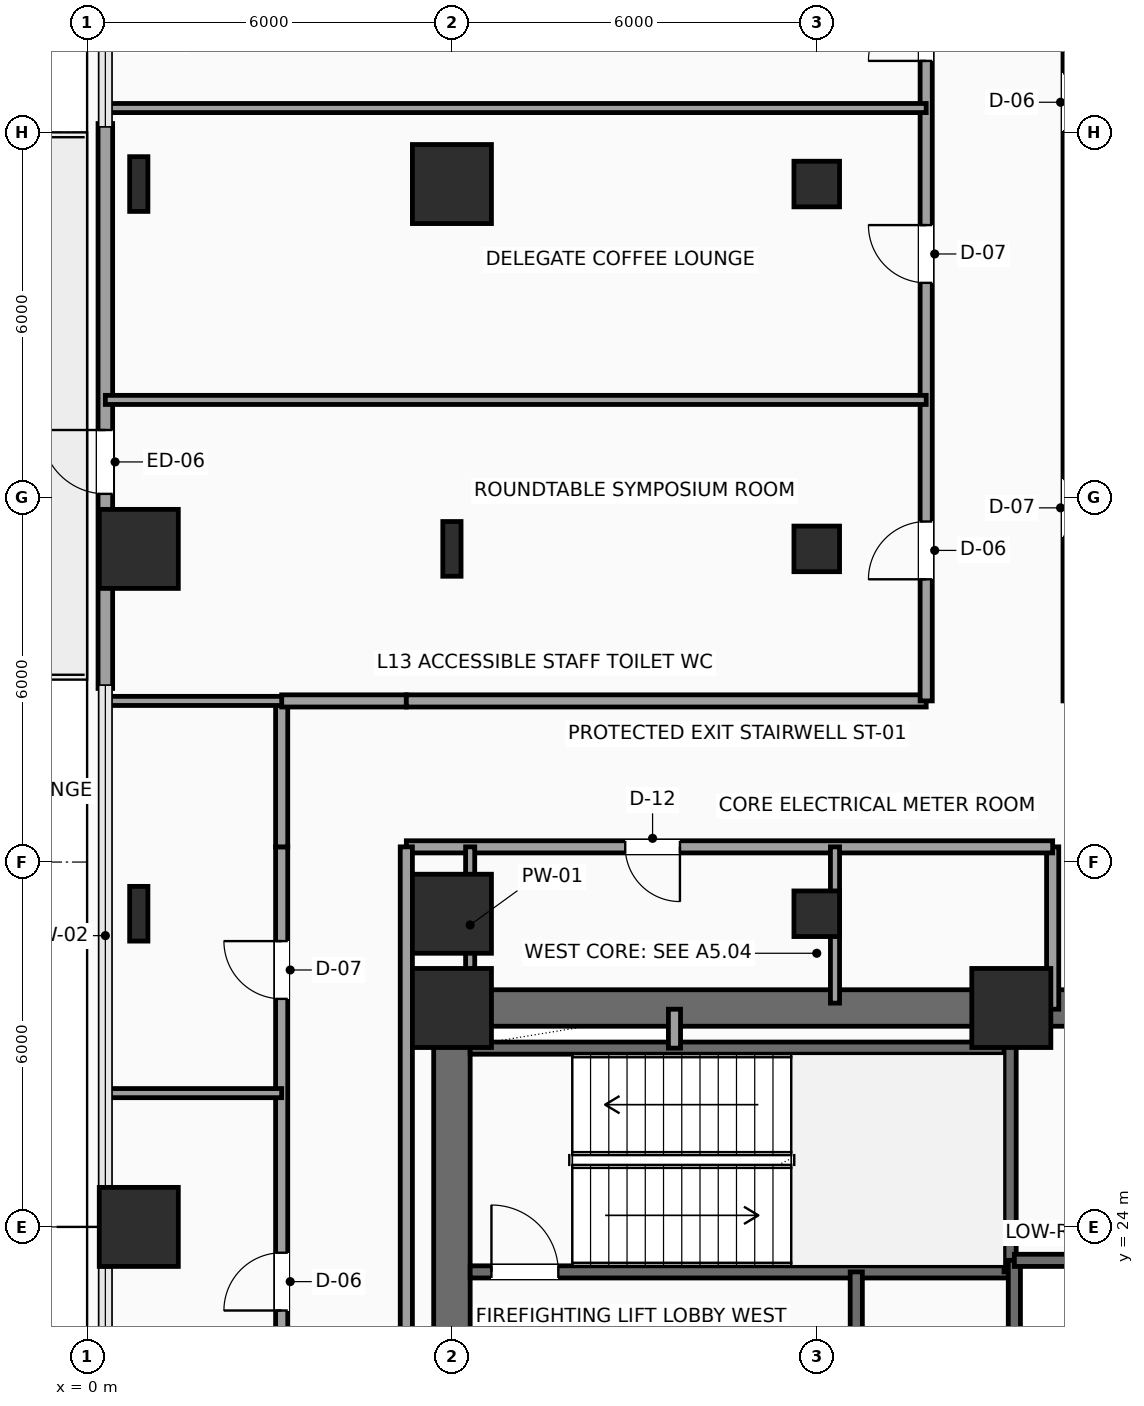
"""IFC4 building model, lengths in metres.
Left out: names, types, materials, properties, quantities, classifications, styles, units other than length and angle.
Written with IfcOpenShell. Run it as: python <this file> out.ifc"""

import sys

from ifc_helpers import new_model, si_unit, direction, frame, frame_2d, origin, origin_2d, place, context, subcontext, project, spatial, rectangle, hollow_rectangle, i_section, extrude, element, fill, save


model = new_model("IFC4")
c1 = context("Model", 3, precision=1e-05, world=origin(), true_north=direction((0.0, 1.0)))
c2 = subcontext(c1, "Body", "Model", "MODEL_VIEW")
j1 = project(units=[si_unit("LENGTHUNIT", "METRE"), si_unit("PLANEANGLEUNIT", "RADIAN")], contexts=[c1])
p1 = place(None, origin())
s1 = spatial("IfcSite", under=j1, at=p1, CompositionType="ELEMENT")
p2 = place(p1, origin())
s2 = spatial("IfcBuilding", under=s1, at=p2, CompositionType="ELEMENT")
p3 = place(p2, frame((0.0, 0.0, 59.7)))
s3 = spatial("IfcBuildingStorey", under=s2, at=p3, CompositionType="ELEMENT", Elevation=59.7)
for number, where, z_axis, x_axis in (
    (1, (6.0, 27.6, 0.0), (0.0, 0.0, 1.0), (1.0, 0.0, 0.0)),
    (2, (15.2, 27.6, 0.0), (0.0, 0.0, 1.0), (1.0, 0.0, 0.0)),
    (3, (0.85, 24.0, 0.0), (0.0, 0.0, 1.0), (1.0, 0.0, 0.0)),
):
    element("IfcColumn", number, at=place(p3, frame(where, z_axis=z_axis, x_axis=x_axis)), inside=s3, PredefinedType="COLUMN", context=c2, shape_type="SweptSolid", body=[
        extrude(rectangle(XDim=1.3, YDim=1.3, at=origin_2d()), origin(), (0.0, 0.0, 1.0), 3.9),
    ])
p4 = place(p3, frame((0.85, 29.15, 0.0), z_axis=(0.0, 0.0, 1.0), x_axis=(1.0, 0.0, 0.0)))
e4 = element("IfcColumn", 4, at=p4, inside=s3, PredefinedType="COLUMN", context=c2, shape_type="SweptSolid", body=[
    extrude(i_section(OverallWidth=0.3, OverallDepth=0.9, WebThickness=0.019, FlangeThickness=0.035, FilletRadius=0.03, at=origin_2d()), origin(), (0.0, 0.0, 1.0), 3.9),
])
p5 = place(p3, frame((0.85, 35.15, 0.0), z_axis=(0.0, 0.0, 1.0), x_axis=(1.0, 0.0, 0.0)))
e5 = element("IfcColumn", 5, at=p5, inside=s3, PredefinedType="COLUMN", context=c2, shape_type="SweptSolid", body=[
    extrude(rectangle(XDim=1.3, YDim=1.3, at=origin_2d()), origin(), (0.0, 0.0, 1.0), 3.9),
])
p6 = place(p3, frame((0.85, 41.15, 0.0), z_axis=(0.0, 0.0, 1.0), x_axis=(1.0, 0.0, 0.0)))
e6 = element("IfcColumn", 6, at=p6, inside=s3, PredefinedType="COLUMN", context=c2, shape_type="SweptSolid", body=[
    extrude(i_section(OverallWidth=0.3, OverallDepth=0.9, WebThickness=0.019, FlangeThickness=0.035, FilletRadius=0.03, at=origin_2d()), origin(), (0.0, 0.0, 1.0), 3.9),
])
p7 = place(p3, frame((6.0, 29.15, 0.0), z_axis=(0.0, 0.0, 1.0), x_axis=(1.0, 0.0, 0.0)))
e7 = element("IfcColumn", 7, at=p7, inside=s3, PredefinedType="COLUMN", context=c2, shape_type="SweptSolid", body=[
    extrude(rectangle(XDim=1.3, YDim=1.3, at=origin_2d()), origin(), (0.0, 0.0, 1.0), 3.9),
])
p8 = place(p3, frame((6.0, 35.15, 0.0), z_axis=(0.0, 0.0, 1.0), x_axis=(1.0, 0.0, 0.0)))
e8 = element("IfcColumn", 8, at=p8, inside=s3, PredefinedType="COLUMN", context=c2, shape_type="SweptSolid", body=[
    extrude(i_section(OverallWidth=0.3, OverallDepth=0.9, WebThickness=0.019, FlangeThickness=0.035, FilletRadius=0.03, at=origin_2d()), origin(), (0.0, 0.0, 1.0), 3.9),
])
p9 = place(p3, frame((6.0, 41.15, 0.0), z_axis=(0.0, 0.0, 1.0), x_axis=(1.0, 0.0, 0.0)))
e9 = element("IfcColumn", 9, at=p9, inside=s3, PredefinedType="COLUMN", context=c2, shape_type="SweptSolid", body=[
    extrude(rectangle(XDim=1.3, YDim=1.3, at=origin_2d()), origin(), (0.0, 0.0, 1.0), 3.9),
])
for number, where, z_axis, x_axis in (
    (10, (12.0, 29.15, 0.0), (0.0, 0.0, 1.0), (1.0, 0.0, 0.0)),
    (11, (12.0, 35.15, 0.0), (0.0, 0.0, 1.0), (1.0, 0.0, 0.0)),
    (12, (12.0, 41.15, 0.0), (0.0, 0.0, 1.0), (1.0, 0.0, 0.0)),
):
    element("IfcColumn", number, at=place(p3, frame(where, z_axis=z_axis, x_axis=x_axis)), inside=s3, PredefinedType="COLUMN", context=c2, shape_type="SweptSolid", body=[
        extrude(hollow_rectangle(XDim=0.75, YDim=0.75, WallThickness=0.035, InnerFilletRadius=0.035, OuterFilletRadius=0.05, at=origin_2d()), origin(), (0.0, 0.0, 1.0), 3.9),
    ])
p10 = place(p3, frame((0.3, 32.855, 0.0), z_axis=(0.0, 0.0, 1.0), x_axis=(0.0, 1.0, 0.0)))
e13 = element("IfcWall", 13, at=p10, inside=s3, PredefinedType="SOLIDWALL", context=c2, shape_type="SweptSolid", body=[
    extrude(rectangle(XDim=9.29, YDim=0.24, at=frame_2d((4.645, 0.0))), origin(), (0.0, 0.0, 1.0), 3.65),
])
p11 = place(p10, frame((3.2, 0.0, 0.0)))
e14 = element("IfcOpeningElement", 14, at=p11, cuts=e13, PredefinedType="OPENING", context=c2, shape_type="SweptSolid", body=[
    extrude(rectangle(XDim=1.05, YDim=2.2, at=frame_2d((0.525, 1.1))), frame((0.0, 0.13, 0.0), z_axis=(0.0, -1.0, 0.0), x_axis=(1.0, 0.0, 0.0)), (0.0, 0.0, 1.0), 0.26),
])
p12 = place(p3, frame((6.0, 27.6, 0.0), z_axis=(0.0, 0.0, 1.0), x_axis=(1.0, 0.0, 0.0)))
e15 = element("IfcWall", 15, at=p12, inside=s3, PredefinedType="SHEAR", context=c2, shape_type="SweptSolid", body=[
    extrude(rectangle(XDim=12.0, YDim=0.6, at=frame_2d((6.0, 0.0))), origin(), (0.0, 0.0, 1.0), 3.65),
])
p13 = place(p12, frame((10.2, 0.0, 0.0)))
e16 = element("IfcOpeningElement", 16, at=p13, cuts=e15, PredefinedType="OPENING", context=c2, shape_type="SweptSolid", body=[
    extrude(rectangle(XDim=0.9, YDim=2.15, at=frame_2d((0.45, 1.075))), frame((0.0, 0.31, 0.0), z_axis=(0.0, -1.0, 0.0), x_axis=(1.0, 0.0, 0.0)), (0.0, 0.0, 1.0), 0.62),
])
p14 = place(p3, frame((6.0, 18.0, 0.0), z_axis=(0.0, 0.0, 1.0), x_axis=(0.0, 1.0, 0.0)))
e17 = element("IfcWall", 17, at=p14, inside=s3, PredefinedType="SHEAR", context=c2, shape_type="SweptSolid", body=[
    extrude(rectangle(XDim=9.6, YDim=0.6, at=frame_2d((4.8, 0.0))), origin(), (0.0, 0.0, 1.0), 3.65),
])
p15 = place(p3, frame((6.3, 23.26, 0.0), z_axis=(0.0, 0.0, 1.0), x_axis=(1.0, 0.0, 0.0)))
e18 = element("IfcWall", 18, at=p15, inside=s3, PredefinedType="SHEAR", context=c2, shape_type="SweptSolid", body=[
    extrude(rectangle(XDim=8.88, YDim=0.2, at=frame_2d((4.44, 0.0))), origin(), (0.0, 0.0, 1.0), 3.65),
])
p16 = place(p15, frame((0.35, 0.0, 0.0)))
e19 = element("IfcOpeningElement", 19, at=p16, cuts=e18, PredefinedType="OPENING", context=c2, shape_type="SweptSolid", body=[
    extrude(rectangle(XDim=1.1, YDim=2.2, at=frame_2d((0.55, 1.1))), frame((0.0, 0.11, 0.0), z_axis=(0.0, -1.0, 0.0), x_axis=(1.0, 0.0, 0.0)), (0.0, 0.0, 1.0), 0.22),
])
p17 = place(p3, frame((6.3, 26.94, 0.0), z_axis=(0.0, 0.0, 1.0), x_axis=(1.0, 0.0, 0.0)))
e20 = element("IfcWall", 20, at=p17, inside=s3, PredefinedType="SHEAR", context=c2, shape_type="SweptSolid", body=[
    extrude(rectangle(XDim=8.88, YDim=0.2, at=frame_2d((4.44, 0.0))), origin(), (0.0, 0.0, 1.0), 3.65),
])
p18 = place(p3, frame((15.18, 23.26, 0.0), z_axis=(0.0, 0.0, 1.0), x_axis=(0.0, 1.0, 0.0)))
e21 = element("IfcWall", 21, at=p18, inside=s3, PredefinedType="SHEAR", context=c2, shape_type="SweptSolid", body=[
    extrude(rectangle(XDim=4.04, YDim=0.2, at=frame_2d((2.02, 0.0))), origin(), (0.0, 0.0, 1.0), 3.65),
])
p19 = place(p3, frame((12.65, 20.42, 0.0), z_axis=(0.0, 0.0, 1.0), x_axis=(0.0, 1.0, 0.0)))
e22 = element("IfcWall", 22, at=p19, inside=s3, PredefinedType="SHEAR", context=c2, shape_type="SweptSolid", body=[
    extrude(rectangle(XDim=2.84, YDim=0.2, at=frame_2d((1.42, 0.0))), origin(), (0.0, 0.0, 1.0), 3.65),
])
p20 = place(p19, frame((0.9, 0.0, 0.0)))
e23 = element("IfcOpeningElement", 23, at=p20, cuts=e22, PredefinedType="OPENING", context=c2, shape_type="SweptSolid", body=[
    extrude(rectangle(XDim=0.9, YDim=2.15, at=frame_2d((0.45, 1.075))), frame((0.0, 0.11, 0.0), z_axis=(0.0, -1.0, 0.0), x_axis=(1.0, 0.0, 0.0)), (0.0, 0.0, 1.0), 0.22),
])
p21 = place(p3, frame((9.66, 26.94, 0.0), z_axis=(0.0, 0.0, 1.0), x_axis=(0.0, 1.0, 0.0)))
e24 = element("IfcWall", 24, at=p21, inside=s3, PredefinedType="SOLIDWALL", context=c2, shape_type="SweptSolid", body=[
    extrude(rectangle(XDim=0.64, YDim=0.2, at=frame_2d((0.32, 0.0))), origin(), (0.0, 0.0, 1.0), 3.65),
])
p22 = place(p3, frame((15.25, 18.25, 0.0), z_axis=(0.0, 0.0, 1.0), x_axis=(0.0, 1.0, 0.0)))
e25 = element("IfcWall", 25, at=p22, inside=s3, PredefinedType="SHEAR", context=c2, shape_type="SweptSolid", body=[
    extrude(rectangle(XDim=5.2, YDim=0.2, at=frame_2d((2.6, 0.0))), origin(), (0.0, 0.0, 1.0), 3.65),
])
p23 = place(p3, frame((15.25, 23.45, 0.0), z_axis=(0.0, 0.0, 1.0), x_axis=(1.0, 0.0, 0.0)))
e26 = element("IfcWall", 26, at=p23, inside=s3, PredefinedType="SHEAR", context=c2, shape_type="SweptSolid", body=[
    extrude(rectangle(XDim=2.45, YDim=0.2, at=frame_2d((1.225, 0.0))), origin(), (0.0, 0.0, 1.0), 3.65),
])
p24 = place(p3, frame((3.2, 13.8, 0.0), z_axis=(0.0, 0.0, 1.0), x_axis=(0.0, 1.0, 0.0)))
e27 = element("IfcWall", 27, at=p24, inside=s3, PredefinedType="SOLIDWALL", context=c2, shape_type="SweptSolid", body=[
    extrude(rectangle(XDim=16.45, YDim=0.2, at=frame_2d((8.225, 0.0))), origin(), (0.0, 0.0, 1.0), 3.65),
])
p25 = place(p24, frame((2.625, 0.0, 0.0)))
e28 = element("IfcOpeningElement", 28, at=p25, cuts=e27, PredefinedType="OPENING", context=c2, shape_type="SweptSolid", body=[
    extrude(rectangle(XDim=0.95, YDim=2.15, at=frame_2d((0.475, 1.075))), frame((0.0, 0.11, 0.0), z_axis=(0.0, -1.0, 0.0), x_axis=(1.0, 0.0, 0.0)), (0.0, 0.0, 1.0), 0.22),
])
p26 = place(p24, frame((8.825, 0.0, 0.0)))
e29 = element("IfcOpeningElement", 29, at=p26, cuts=e27, PredefinedType="OPENING", context=c2, shape_type="SweptSolid", body=[
    extrude(rectangle(XDim=0.95, YDim=2.15, at=frame_2d((0.475, 1.075))), frame((0.0, 0.11, 0.0), z_axis=(0.0, -1.0, 0.0), x_axis=(1.0, 0.0, 0.0)), (0.0, 0.0, 1.0), 0.22),
])
p27 = place(p24, frame((13.95, 0.0, 0.0)))
e30 = element("IfcOpeningElement", 30, at=p27, cuts=e27, PredefinedType="OPENING", context=c2, shape_type="SweptSolid", body=[
    extrude(rectangle(XDim=0.95, YDim=2.15, at=frame_2d((0.475, 1.075))), frame((0.0, 0.11, 0.0), z_axis=(0.0, -1.0, 0.0), x_axis=(1.0, 0.0, 0.0)), (0.0, 0.0, 1.0), 0.22),
])
p28 = place(p3, frame((3.2, 30.25, 0.0), z_axis=(0.0, 0.0, 1.0), x_axis=(0.0, 1.0, 0.0)))
e31 = element("IfcWall", 31, at=p28, inside=s3, PredefinedType="SOLIDWALL", context=c2, shape_type="SweptSolid", body=[
    extrude(rectangle(XDim=2.4, YDim=0.2, at=frame_2d((1.2, 0.0))), origin(), (0.0, 0.0, 1.0), 3.65),
])
p29 = place(p3, frame((3.2, 32.65, 0.0), z_axis=(0.0, 0.0, 1.0), x_axis=(1.0, 0.0, 0.0)))
e32 = element("IfcWall", 32, at=p29, inside=s3, PredefinedType="SOLIDWALL", context=c2, shape_type="SweptSolid", body=[
    extrude(rectangle(XDim=2.05, YDim=0.2, at=frame_2d((1.025, 0.0))), origin(), (0.0, 0.0, 1.0), 3.65),
])
p30 = place(p3, frame((5.25, 32.65, 0.0), z_axis=(0.0, 0.0, 1.0), x_axis=(1.0, 0.0, 0.0)))
e33 = element("IfcWall", 33, at=p30, inside=s3, PredefinedType="SOLIDWALL", context=c2, shape_type="SweptSolid", body=[
    extrude(rectangle(XDim=8.55, YDim=0.2, at=frame_2d((4.275, 0.0))), origin(), (0.0, 0.0, 1.0), 3.65),
])
p31 = place(p3, frame((13.8, 32.65, 0.0), z_axis=(0.0, 0.0, 1.0), x_axis=(0.0, 1.0, 0.0)))
e34 = element("IfcWall", 34, at=p31, inside=s3, PredefinedType="SOLIDWALL", context=c2, shape_type="SweptSolid", body=[
    extrude(rectangle(XDim=12.25, YDim=0.2, at=frame_2d((6.125, 0.0))), origin(), (0.0, 0.0, 1.0), 3.65),
])
p32 = place(p31, frame((2.0, 0.0, 0.0)))
e35 = element("IfcOpeningElement", 35, at=p32, cuts=e34, PredefinedType="OPENING", context=c2, shape_type="SweptSolid", body=[
    extrude(rectangle(XDim=0.95, YDim=2.15, at=frame_2d((0.475, 1.075))), frame((0.0, 0.11, 0.0), z_axis=(0.0, -1.0, 0.0), x_axis=(1.0, 0.0, 0.0)), (0.0, 0.0, 1.0), 0.22),
])
p33 = place(p31, frame((6.875, 0.0, 0.0)))
e36 = element("IfcOpeningElement", 36, at=p33, cuts=e34, PredefinedType="OPENING", context=c2, shape_type="SweptSolid", body=[
    extrude(rectangle(XDim=0.95, YDim=2.15, at=frame_2d((0.475, 1.075))), frame((0.0, 0.11, 0.0), z_axis=(0.0, -1.0, 0.0), x_axis=(1.0, 0.0, 0.0)), (0.0, 0.0, 1.0), 0.22),
])
p34 = place(p31, frame((10.525, 0.0, 0.0)))
e37 = element("IfcOpeningElement", 37, at=p34, cuts=e34, PredefinedType="OPENING", context=c2, shape_type="SweptSolid", body=[
    extrude(rectangle(XDim=0.95, YDim=2.15, at=frame_2d((0.475, 1.075))), frame((0.0, 0.11, 0.0), z_axis=(0.0, -1.0, 0.0), x_axis=(1.0, 0.0, 0.0)), (0.0, 0.0, 1.0), 0.22),
])
p35 = place(p3, frame((16.15, 44.9, 0.0), z_axis=(0.0, 0.0, 1.0), x_axis=(0.0, -1.0, 0.0)))
e38 = element("IfcWall", 38, at=p35, inside=s3, PredefinedType="SOLIDWALL", context=c2, shape_type="SweptSolid", body=[
    extrude(rectangle(XDim=12.25, YDim=0.2, at=frame_2d((6.125, 0.0))), origin(), (0.0, 0.0, 1.0), 3.65),
])
p36 = place(p35, frame((8.6, 0.0, 0.0)))
e39 = element("IfcOpeningElement", 39, at=p36, cuts=e38, PredefinedType="OPENING", context=c2, shape_type="SweptSolid", body=[
    extrude(rectangle(XDim=0.95, YDim=2.15, at=frame_2d((0.475, 1.075))), frame((0.0, 0.11, 0.0), z_axis=(0.0, -1.0, 0.0), x_axis=(1.0, 0.0, 0.0)), (0.0, 0.0, 1.0), 0.22),
])
p37 = place(p35, frame((1.93, 0.0, 0.0)))
e40 = element("IfcOpeningElement", 40, at=p37, cuts=e38, PredefinedType="OPENING", context=c2, shape_type="SweptSolid", body=[
    extrude(rectangle(XDim=0.95, YDim=2.15, at=frame_2d((0.475, 1.075))), frame((0.0, 0.11, 0.0), z_axis=(0.0, -1.0, 0.0), x_axis=(1.0, 0.0, 0.0)), (0.0, 0.0, 1.0), 0.22),
])
p38 = place(p3, frame((15.88, 27.58, 0.0), z_axis=(0.0, 0.0, 1.0), x_axis=(0.0, 1.0, 0.0)))
e41 = element("IfcWall", 41, at=p38, inside=s3, PredefinedType="SOLIDWALL", context=c2, shape_type="SweptSolid", body=[
    extrude(rectangle(XDim=2.67, YDim=0.2, at=frame_2d((1.335, 0.0))), origin(), (0.0, 0.0, 1.0), 3.65),
])
p39 = place(p3, frame((15.88, 30.25, 0.0), z_axis=(0.0, 0.0, 1.0), x_axis=(-1.0, 0.0, 0.0)))
e42 = element("IfcWall", 42, at=p39, inside=s3, PredefinedType="SOLIDWALL", context=c2, shape_type="SweptSolid", body=[
    extrude(rectangle(XDim=10.63, YDim=0.2, at=frame_2d((5.315, 0.0))), origin(), (0.0, 0.0, 1.0), 3.65),
])
p40 = place(p39, frame((6.13, 0.0, 0.0)))
e43 = element("IfcOpeningElement", 43, at=p40, cuts=e42, PredefinedType="OPENING", context=c2, shape_type="SweptSolid", body=[
    extrude(rectangle(XDim=0.9, YDim=2.1, at=frame_2d((0.45, 1.05))), frame((0.0, 0.11, 0.0), z_axis=(0.0, -1.0, 0.0), x_axis=(1.0, 0.0, 0.0)), (0.0, 0.0, 1.0), 0.22),
])
p41 = place(p3, frame((5.25, 30.25, 0.0), z_axis=(0.0, 0.0, 1.0), x_axis=(0.0, -1.0, 0.0)))
e44 = element("IfcWall", 44, at=p41, inside=s3, PredefinedType="SOLIDWALL", context=c2, shape_type="SweptSolid", body=[
    extrude(rectangle(XDim=14.1, YDim=0.2, at=frame_2d((7.05, 0.0))), origin(), (0.0, 0.0, 1.0), 3.65),
])
for number, where, z_axis, x_axis in (
    (45, (6.3, 27.68, 0.0), (0.0, 0.0, 1.0), (0.0, 1.0, 0.0)),
    (46, (12.3, 27.68, 0.0), (0.0, 0.0, 1.0), (0.0, 1.0, 0.0)),
):
    element("IfcWall", number, at=place(p3, frame(where, z_axis=z_axis, x_axis=x_axis)), inside=s3, PredefinedType="PARTITIONING", context=c2, shape_type="SweptSolid", body=[
        extrude(rectangle(XDim=2.57, YDim=0.15, at=frame_2d((1.285, 0.0))), origin(), (0.0, 0.0, 1.0), 2.992),
    ])
for number, where, z_axis, x_axis in (
    (47, (0.3, 37.6, 0.0), (0.0, 0.0, 1.0), (1.0, 0.0, 0.0)),
    (48, (0.3, 42.4, 0.0), (0.0, 0.0, 1.0), (1.0, 0.0, 0.0)),
):
    element("IfcWall", number, at=place(p3, frame(where, z_axis=z_axis, x_axis=x_axis)), inside=s3, PredefinedType="PARTITIONING", context=c2, shape_type="SweptSolid", body=[
        extrude(rectangle(XDim=13.5, YDim=0.15, at=frame_2d((6.75, 0.0))), origin(), (0.0, 0.0, 1.0), 3.65),
    ])
for number, where, z_axis, x_axis in (
    (49, (0.3, 26.2, 0.0), (0.0, 0.0, 1.0), (1.0, 0.0, 0.0)),
    (50, (0.3, 32.65, 0.0), (0.0, 0.0, 1.0), (1.0, 0.0, 0.0)),
):
    element("IfcWall", number, at=place(p3, frame(where, z_axis=z_axis, x_axis=x_axis)), inside=s3, PredefinedType="PARTITIONING", context=c2, shape_type="SweptSolid", body=[
        extrude(rectangle(XDim=2.9, YDim=0.15, at=frame_2d((1.45, 0.0))), origin(), (0.0, 0.0, 1.0), 3.65),
    ])
p42 = place(p11, origin())
e51 = element("IfcDoor", 51, at=p42, inside=s3, OperationType="SINGLE_SWING_RIGHT", PredefinedType="DOOR", context=c2, shape_type="SweptSolid", body=[
    extrude(rectangle(XDim=1.05, YDim=2.2, at=frame_2d((0.525, 1.1))), frame((0.0, 0.025, 0.0), z_axis=(0.0, -1.0, 0.0), x_axis=(1.0, 0.0, 0.0)), (0.0, 0.0, 1.0), 0.05),
])
fill(e14, e51)
p43 = place(p16, origin())
e52 = element("IfcDoor", 52, at=p43, inside=s3, OperationType="SINGLE_SWING_LEFT", PredefinedType="DOOR", context=c2, shape_type="SweptSolid", body=[
    extrude(rectangle(XDim=1.1, YDim=2.2, at=frame_2d((0.55, 1.1))), frame((0.0, 0.025, 0.0), z_axis=(0.0, -1.0, 0.0), x_axis=(1.0, 0.0, 0.0)), (0.0, 0.0, 1.0), 0.05),
])
fill(e19, e52)
p44 = place(p26, origin())
e53 = element("IfcDoor", 53, at=p44, inside=s3, OperationType="SINGLE_SWING_LEFT", PredefinedType="DOOR", context=c2, shape_type="SweptSolid", body=[
    extrude(rectangle(XDim=0.95, YDim=2.15, at=frame_2d((0.475, 1.075))), frame((0.0, 0.025, 0.0), z_axis=(0.0, -1.0, 0.0), x_axis=(1.0, 0.0, 0.0)), (0.0, 0.0, 1.0), 0.05),
])
fill(e29, e53)
p45 = place(p27, origin())
e54 = element("IfcDoor", 54, at=p45, inside=s3, OperationType="SINGLE_SWING_RIGHT", PredefinedType="DOOR", context=c2, shape_type="SweptSolid", body=[
    extrude(rectangle(XDim=0.95, YDim=2.15, at=frame_2d((0.475, 1.075))), frame((0.0, 0.025, 0.0), z_axis=(0.0, -1.0, 0.0), x_axis=(1.0, 0.0, 0.0)), (0.0, 0.0, 1.0), 0.05),
])
fill(e30, e54)
p46 = place(p32, origin())
e55 = element("IfcDoor", 55, at=p46, inside=s3, OperationType="SINGLE_SWING_LEFT", PredefinedType="DOOR", context=c2, shape_type="SweptSolid", body=[
    extrude(rectangle(XDim=0.95, YDim=2.15, at=frame_2d((0.475, 1.075))), frame((0.0, 0.025, 0.0), z_axis=(0.0, -1.0, 0.0), x_axis=(1.0, 0.0, 0.0)), (0.0, 0.0, 1.0), 0.05),
])
fill(e35, e55)
p47 = place(p33, origin())
e56 = element("IfcDoor", 56, at=p47, inside=s3, OperationType="SINGLE_SWING_RIGHT", PredefinedType="DOOR", context=c2, shape_type="SweptSolid", body=[
    extrude(rectangle(XDim=0.95, YDim=2.15, at=frame_2d((0.475, 1.075))), frame((0.0, 0.025, 0.0), z_axis=(0.0, -1.0, 0.0), x_axis=(1.0, 0.0, 0.0)), (0.0, 0.0, 1.0), 0.05),
])
fill(e36, e56)
p48 = place(p34, origin())
e57 = element("IfcDoor", 57, at=p48, inside=s3, OperationType="SINGLE_SWING_LEFT", PredefinedType="DOOR", context=c2, shape_type="SweptSolid", body=[
    extrude(rectangle(XDim=0.95, YDim=2.15, at=frame_2d((0.475, 1.075))), frame((0.0, 0.025, 0.0), z_axis=(0.0, -1.0, 0.0), x_axis=(1.0, 0.0, 0.0)), (0.0, 0.0, 1.0), 0.05),
])
fill(e37, e57)
p49 = place(p40, origin())
e58 = element("IfcDoor", 58, at=p49, inside=s3, OperationType="SINGLE_SWING_LEFT", PredefinedType="DOOR", context=c2, shape_type="SweptSolid", body=[
    extrude(rectangle(XDim=0.9, YDim=2.1, at=frame_2d((0.45, 1.05))), frame((0.0, 0.025, 0.0), z_axis=(0.0, -1.0, 0.0), x_axis=(1.0, 0.0, 0.0)), (0.0, 0.0, 1.0), 0.05),
])
fill(e43, e58)
save(model, sys.argv[1])
